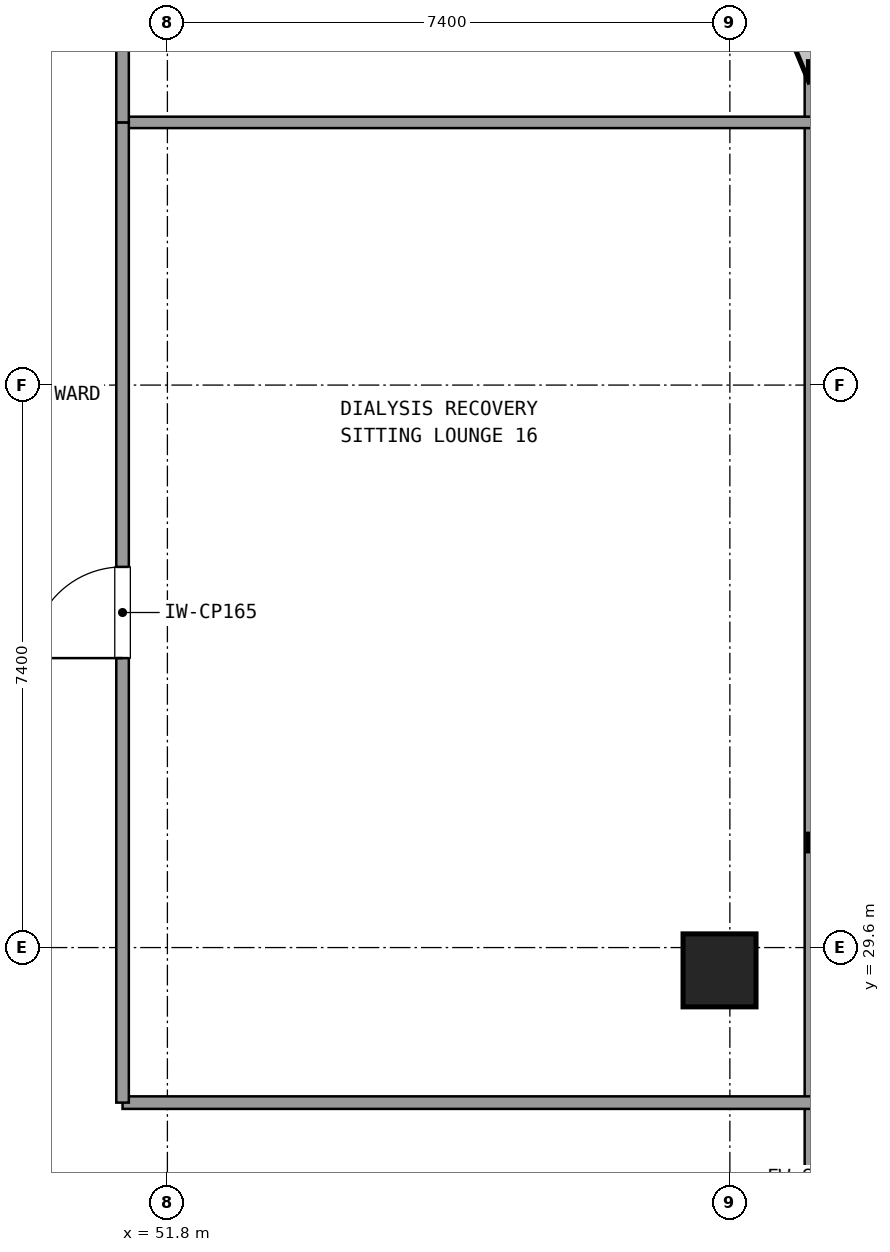
"""IFC4 building model, lengths in metres.
Left out: names, types, materials, properties, quantities, classifications, styles, units other than length and angle.
Written with IfcOpenShell. Run it as: python <this file> out.ifc"""

import sys

from ifc_helpers import new_model, si_unit, direction, frame, frame_2d, origin, origin_2d, place, context, subcontext, project, spatial, rectangle, extrude, element, fill, save


model = new_model("IFC4")
c1 = context("Model", 3, precision=1e-05, world=origin(), true_north=direction((0.0, 1.0)))
c2 = subcontext(c1, "Body", "Model", "MODEL_VIEW")
j1 = project(units=[si_unit("LENGTHUNIT", "METRE"), si_unit("PLANEANGLEUNIT", "RADIAN")], contexts=[c1])
p1 = place(None, origin())
s1 = spatial("IfcSite", under=j1, at=p1, CompositionType="ELEMENT")
p2 = place(p1, origin())
s2 = spatial("IfcBuilding", under=s1, at=p2, CompositionType="ELEMENT")
p3 = place(p2, frame((0.0, 0.0, 152.82)))
s3 = spatial("IfcBuildingStorey", under=s2, at=p3, CompositionType="ELEMENT", Elevation=152.82)
p4 = place(p3, frame((59.064, 29.3, 0.0), z_axis=(0.0, 0.0, 1.0), x_axis=(1.0, 0.0, 0.0)))
e1 = element("IfcColumn", 1, at=p4, inside=s3, PredefinedType="COLUMN", context=c2, shape_type="SweptSolid", body=[
    extrude(rectangle(XDim=0.96, YDim=0.96, at=origin_2d()), origin(), (0.0, 0.0, 1.0), 3.6),
])
p5 = place(p3, frame((60.304, 10.655, 0.0), z_axis=(0.0, 0.0, 1.0), x_axis=(0.0, 1.0, 0.0)))
e2 = element("IfcWall", 2, at=p5, inside=s3, PredefinedType="SOLIDWALL", context=c2, shape_type="SweptSolid", body=[
    extrude(rectangle(XDim=30.49, YDim=0.24, at=frame_2d((15.245, 0.0))), origin(), (0.0, 0.0, 1.0), 0.85),
])
p6 = place(p3, frame((51.21, 27.56, 0.0), z_axis=(0.0, 0.0, 1.0), x_axis=(1.0, 0.0, 0.0)))
e3 = element("IfcWall", 3, at=p6, inside=s3, PredefinedType="PARTITIONING", context=c2, shape_type="SweptSolid", body=[
    extrude(rectangle(XDim=9.074, YDim=0.165, at=frame_2d((4.537, 0.0))), origin(), (0.0, 0.0, 1.0), 2.61),
])
p7 = place(p3, frame((51.21, 40.456, 0.0), z_axis=(0.0, 0.0, 1.0), x_axis=(1.0, 0.0, 0.0)))
e4 = element("IfcWall", 4, at=p7, inside=s3, PredefinedType="PARTITIONING", context=c2, shape_type="SweptSolid", body=[
    extrude(rectangle(XDim=9.074, YDim=0.15, at=frame_2d((4.537, 0.0))), origin(), (0.0, 0.0, 1.0), 2.61),
])
p8 = place(p3, frame((51.21, 27.56, 0.0), z_axis=(0.0, 0.0, 1.0), x_axis=(0.0, 1.0, 0.0)))
e5 = element("IfcWall", 5, at=p8, inside=s3, PredefinedType="PARTITIONING", context=c2, shape_type="SweptSolid", body=[
    extrude(rectangle(XDim=12.896, YDim=0.165, at=frame_2d((6.448, 0.0))), origin(), (0.0, 0.0, 1.0), 2.61),
])
p9 = place(p8, frame((5.848, 0.0, 0.0)))
e6 = element("IfcOpeningElement", 6, at=p9, cuts=e5, PredefinedType="OPENING", context=c2, shape_type="SweptSolid", body=[
    extrude(rectangle(XDim=1.2, YDim=2.15, at=frame_2d((0.6, 1.075))), frame((0.0, 0.093, 0.0), z_axis=(0.0, -1.0, 0.0), x_axis=(1.0, 0.0, 0.0)), (0.0, 0.0, 1.0), 0.185),
])
p10 = place(p3, frame((51.21, 40.456, 0.0), z_axis=(0.0, 0.0, 1.0), x_axis=(0.0, 1.0, 0.0)))
e7 = element("IfcWall", 7, at=p10, inside=s3, PredefinedType="PARTITIONING", context=c2, shape_type="SweptSolid", body=[
    extrude(rectangle(XDim=6.644, YDim=0.165, at=frame_2d((3.322, 0.0))), origin(), (0.0, 0.0, 1.0), 2.61),
])
p11 = place(p10, frame((2.722, 0.0, 0.0)))
e8 = element("IfcOpeningElement", 8, at=p11, cuts=e7, PredefinedType="OPENING", context=c2, shape_type="SweptSolid", body=[
    extrude(rectangle(XDim=1.2, YDim=2.15, at=frame_2d((0.6, 1.075))), frame((0.0, 0.093, 0.0), z_axis=(0.0, -1.0, 0.0), x_axis=(1.0, 0.0, 0.0)), (0.0, 0.0, 1.0), 0.185),
])
p12 = place(p9, origin())
e9 = element("IfcDoor", 9, at=p12, inside=s3, OperationType="SINGLE_SWING_LEFT", PredefinedType="DOOR", context=c2, shape_type="SweptSolid", body=[
    extrude(rectangle(XDim=1.2, YDim=2.15, at=frame_2d((0.6, 1.075))), frame((0.0, 0.025, 0.0), z_axis=(0.0, -1.0, 0.0), x_axis=(1.0, 0.0, 0.0)), (0.0, 0.0, 1.0), 0.05),
])
fill(e6, e9)
save(model, sys.argv[1])
